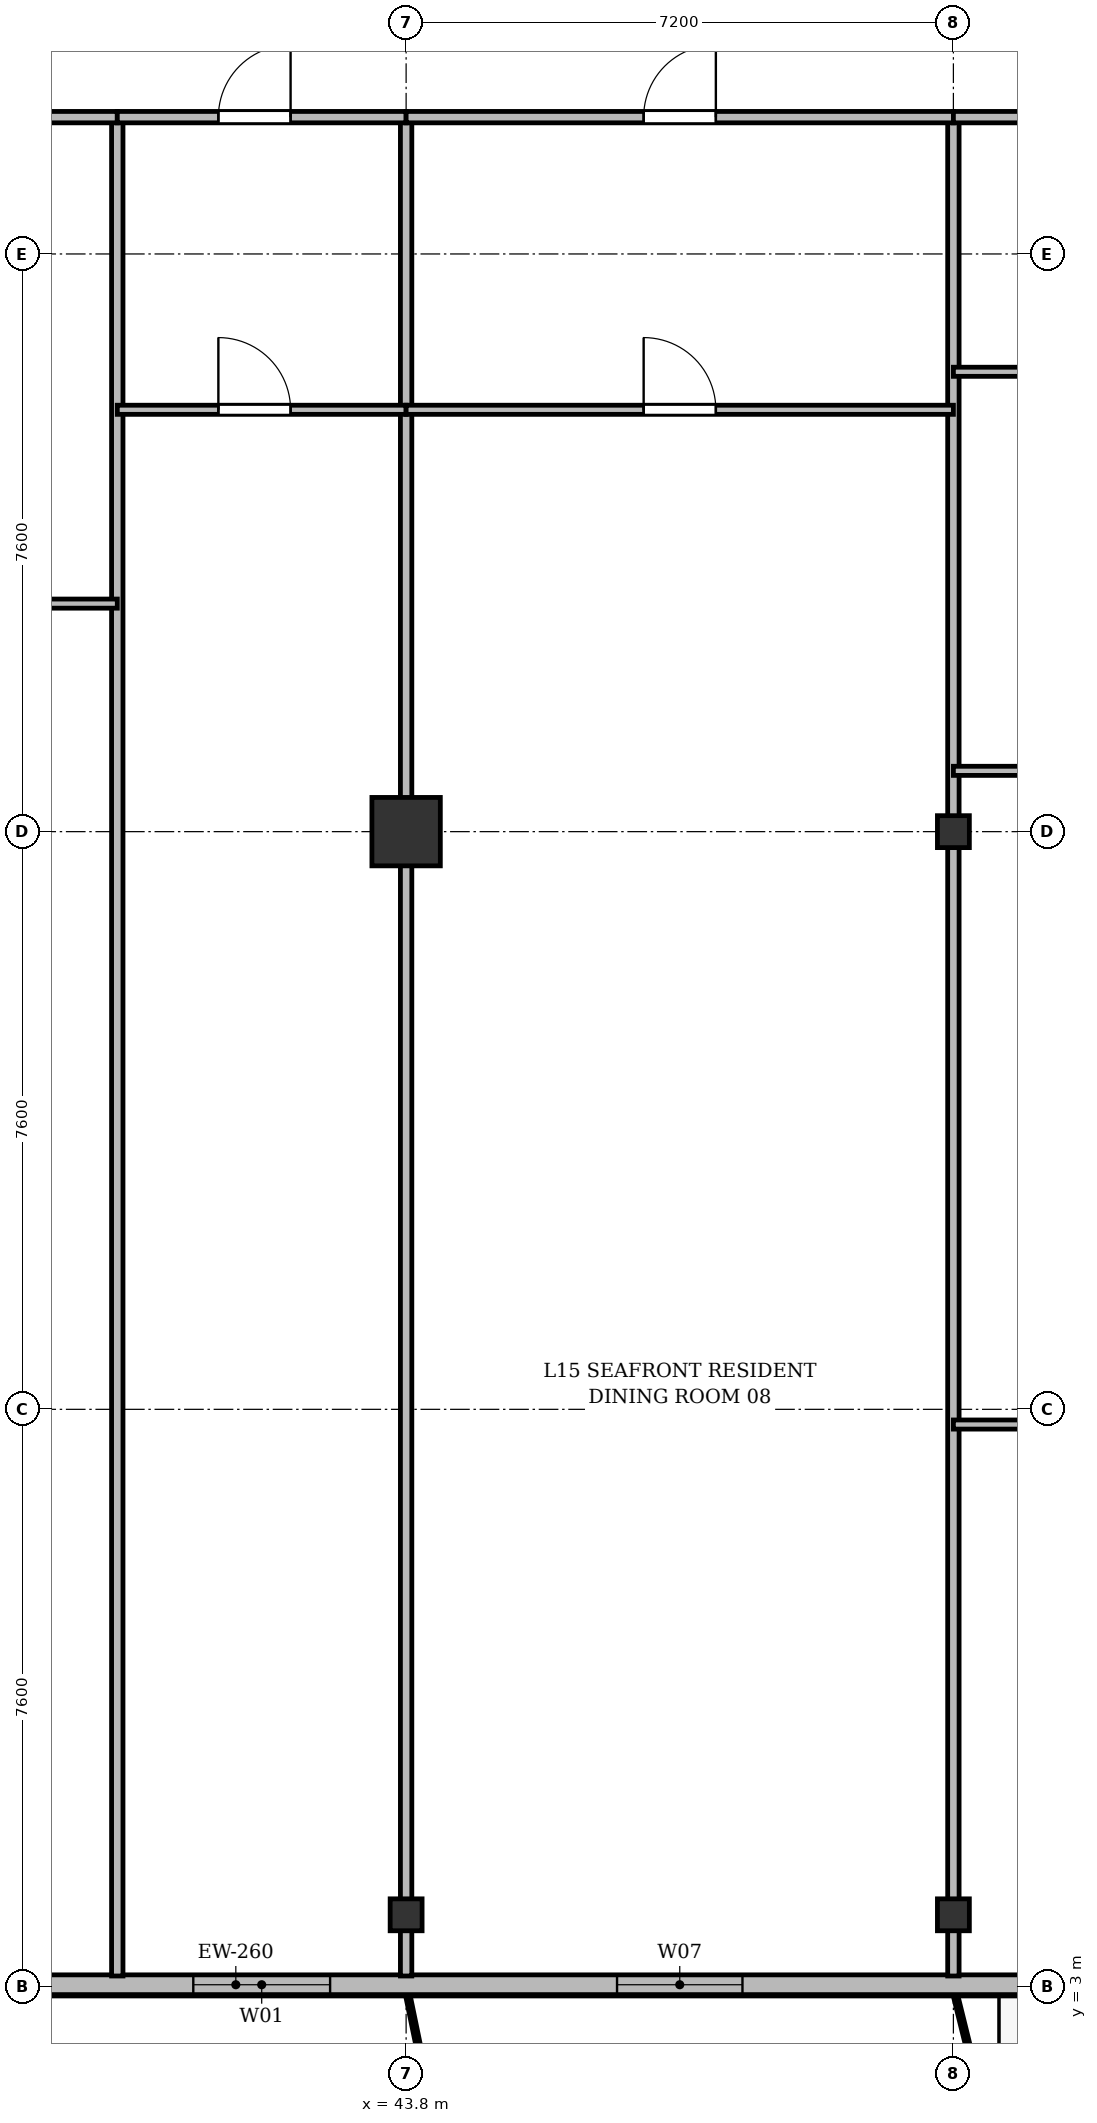
"""IFC4 building model, lengths in metres.
Left out: names, types, materials, properties, quantities, classifications, styles, units other than length and angle.
Written with IfcOpenShell. Run it as: python <this file> out.ifc"""

import sys

from ifc_helpers import new_model, si_unit, direction, frame, frame_2d, origin, origin_2d, place, context, subcontext, project, spatial, rectangle, i_section, extrude, source, transform, mapped, element, fill, save


model = new_model("IFC4")
c1 = context("Model", 3, precision=1e-05, world=origin(), true_north=direction((0.0, 1.0)))
c2 = subcontext(c1, "Body", "Model", "MODEL_VIEW")
j1 = project(units=[si_unit("LENGTHUNIT", "METRE"), si_unit("PLANEANGLEUNIT", "RADIAN")], contexts=[c1])
p1 = place(None, origin())
s1 = spatial("IfcSite", under=j1, at=p1, CompositionType="ELEMENT")
p2 = place(p1, origin())
s2 = spatial("IfcBuilding", under=s1, at=p2, CompositionType="ELEMENT")
p3 = place(p2, frame((0.0, 0.0, 59.5)))
s3 = spatial("IfcBuildingStorey", under=s2, at=p3, CompositionType="ELEMENT", Elevation=59.5)
m1 = source(origin(), c2, "Body", "SweptSolid", [
    extrude(i_section(OverallWidth=0.42, OverallDepth=0.42, WebThickness=0.026, FlangeThickness=0.04, at=origin_2d()), origin(), (0.0, 0.0, 1.0), 3.6),
])
p4 = place(p3, frame((43.8, 3.95, 0.0), z_axis=(0.0, 0.0, 1.0), x_axis=(1.0, 0.0, 0.0)))
e1 = element("IfcColumn", 1, at=p4, inside=s3, PredefinedType="COLUMN", context=c2, shape_type="MappedRepresentation", body=[
    mapped(m1, transform((0.0, 0.0, 0.0), x_axis=(1.0, 0.0, 0.0), y_axis=(0.0, 1.0, 0.0), z_axis=(0.0, 0.0, 1.0), scale=1.0)),
])
m2 = source(origin(), c2, "Body", "SweptSolid", [
    extrude(rectangle(XDim=0.9, YDim=0.9, at=origin_2d()), origin(), (0.0, 0.0, 1.0), 3.6),
])
p5 = place(p3, frame((43.8, 18.2, 0.0), z_axis=(0.0, 0.0, 1.0), x_axis=(1.0, 0.0, 0.0)))
e2 = element("IfcColumn", 2, at=p5, inside=s3, PredefinedType="COLUMN", context=c2, shape_type="MappedRepresentation", body=[
    mapped(m2, transform((0.0, 0.0, 0.0), x_axis=(1.0, 0.0, 0.0), y_axis=(0.0, 1.0, 0.0), z_axis=(0.0, 0.0, 1.0), scale=1.0)),
])
for number, where, z_axis, x_axis in (
    (3, (51.0, 3.95, 0.0), (0.0, 0.0, 1.0), (1.0, 0.0, 0.0)),
    (4, (51.0, 18.2, 0.0), (0.0, 0.0, 1.0), (1.0, 0.0, 0.0)),
):
    element("IfcColumn", number, at=place(p3, frame(where, z_axis=z_axis, x_axis=x_axis)), inside=s3, PredefinedType="COLUMN", context=c2, shape_type="MappedRepresentation", body=[
        mapped(m1, transform((0.0, 0.0, 0.0), x_axis=(1.0, 0.0, 0.0), y_axis=(0.0, 1.0, 0.0), z_axis=(0.0, 0.0, 1.0), scale=1.0)),
    ])
p6 = place(p3, frame((66.9, 3.03, 0.0), z_axis=(0.0, 0.0, 1.0), x_axis=(-1.0, 0.0, 0.0)))
e5 = element("IfcWall", 5, at=p6, inside=s3, PredefinedType="SOLIDWALL", context=c2, shape_type="SweptSolid", body=[
    extrude(rectangle(XDim=59.4, YDim=0.26, at=frame_2d((29.7, 0.0))), origin(), (0.0, 0.0, 1.0), 3.34),
])
p7 = place(p6, frame((3.6, 0.0, 0.9)))
e6 = element("IfcOpeningElement", 6, at=p7, cuts=e5, PredefinedType="OPENING", context=c2, shape_type="SweptSolid", body=[
    extrude(rectangle(XDim=2.2, YDim=1.8, at=frame_2d((1.1, 0.9))), frame((0.0, 0.14, 0.0), z_axis=(0.0, -1.0, 0.0), x_axis=(1.0, 0.0, 0.0)), (0.0, 0.0, 1.0), 0.28),
])
p8 = place(p6, frame((9.18, 0.0, 0.0)))
e7 = element("IfcOpeningElement", 7, at=p8, cuts=e5, PredefinedType="OPENING", context=c2, shape_type="SweptSolid", body=[
    extrude(rectangle(XDim=1.2, YDim=2.2, at=frame_2d((0.6, 1.1))), frame((0.0, 0.14, 0.0), z_axis=(0.0, -1.0, 0.0), x_axis=(1.0, 0.0, 0.0)), (0.0, 0.0, 1.0), 0.28),
])
p9 = place(p6, frame((12.95, 0.0, 0.9)))
e8 = element("IfcOpeningElement", 8, at=p9, cuts=e5, PredefinedType="OPENING", context=c2, shape_type="SweptSolid", body=[
    extrude(rectangle(XDim=2.0, YDim=1.95, at=frame_2d((1.0, 0.975))), frame((0.0, 0.14, 0.0), z_axis=(0.0, -1.0, 0.0), x_axis=(1.0, 0.0, 0.0)), (0.0, 0.0, 1.0), 0.28),
])
p10 = place(p6, frame((18.675, 0.0, 0.9)))
e9 = element("IfcOpeningElement", 9, at=p10, cuts=e5, PredefinedType="OPENING", context=c2, shape_type="SweptSolid", body=[
    extrude(rectangle(XDim=1.65, YDim=1.85, at=frame_2d((0.825, 0.925))), frame((0.0, 0.14, 0.0), z_axis=(0.0, -1.0, 0.0), x_axis=(1.0, 0.0, 0.0)), (0.0, 0.0, 1.0), 0.28),
])
p11 = place(p6, frame((24.1, 0.0, 0.9)))
e10 = element("IfcOpeningElement", 10, at=p11, cuts=e5, PredefinedType="OPENING", context=c2, shape_type="SweptSolid", body=[
    extrude(rectangle(XDim=1.8, YDim=1.8, at=frame_2d((0.9, 0.9))), frame((0.0, 0.14, 0.0), z_axis=(0.0, -1.0, 0.0), x_axis=(1.0, 0.0, 0.0)), (0.0, 0.0, 1.0), 0.28),
])
p12 = place(p6, frame((28.1, 0.0, 0.9)))
e11 = element("IfcOpeningElement", 11, at=p12, cuts=e5, PredefinedType="OPENING", context=c2, shape_type="SweptSolid", body=[
    extrude(rectangle(XDim=2.2, YDim=1.8, at=frame_2d((1.1, 0.9))), frame((0.0, 0.14, 0.0), z_axis=(0.0, -1.0, 0.0), x_axis=(1.0, 0.0, 0.0)), (0.0, 0.0, 1.0), 0.28),
])
p13 = place(p6, frame((33.15, 0.0, 0.9)))
e12 = element("IfcOpeningElement", 12, at=p13, cuts=e5, PredefinedType="OPENING", context=c2, shape_type="SweptSolid", body=[
    extrude(rectangle(XDim=1.5, YDim=1.75, at=frame_2d((0.75, 0.875))), frame((0.0, 0.14, 0.0), z_axis=(0.0, -1.0, 0.0), x_axis=(1.0, 0.0, 0.0)), (0.0, 0.0, 1.0), 0.28),
])
p14 = place(p6, frame((40.301, 0.0, 0.0)))
e13 = element("IfcOpeningElement", 13, at=p14, cuts=e5, PredefinedType="OPENING", context=c2, shape_type="SweptSolid", body=[
    extrude(rectangle(XDim=1.2, YDim=2.2, at=frame_2d((0.6, 1.1))), frame((0.0, 0.14, 0.0), z_axis=(0.0, -1.0, 0.0), x_axis=(1.0, 0.0, 0.0)), (0.0, 0.0, 1.0), 0.28),
])
p15 = place(p6, frame((46.575, 0.0, 0.9)))
e14 = element("IfcOpeningElement", 14, at=p15, cuts=e5, PredefinedType="OPENING", context=c2, shape_type="SweptSolid", body=[
    extrude(rectangle(XDim=1.65, YDim=1.85, at=frame_2d((0.825, 0.925))), frame((0.0, 0.14, 0.0), z_axis=(0.0, -1.0, 0.0), x_axis=(1.0, 0.0, 0.0)), (0.0, 0.0, 1.0), 0.28),
])
p16 = place(p6, frame((53.136, 0.0, 0.0)))
e15 = element("IfcOpeningElement", 15, at=p16, cuts=e5, PredefinedType="OPENING", context=c2, shape_type="SweptSolid", body=[
    extrude(rectangle(XDim=1.2, YDim=2.2, at=frame_2d((0.6, 1.1))), frame((0.0, 0.14, 0.0), z_axis=(0.0, -1.0, 0.0), x_axis=(1.0, 0.0, 0.0)), (0.0, 0.0, 1.0), 0.28),
])
p17 = place(p6, frame((55.3, 0.0, 0.9)))
e16 = element("IfcOpeningElement", 16, at=p17, cuts=e5, PredefinedType="OPENING", context=c2, shape_type="SweptSolid", body=[
    extrude(rectangle(XDim=2.2, YDim=1.8, at=frame_2d((1.1, 0.9))), frame((0.0, 0.14, 0.0), z_axis=(0.0, -1.0, 0.0), x_axis=(1.0, 0.0, 0.0)), (0.0, 0.0, 1.0), 0.28),
])
p18 = place(p3, frame((40.0, 3.145, 0.0), z_axis=(0.0, 0.0, 1.0), x_axis=(0.0, 1.0, 0.0)))
e17 = element("IfcWall", 17, at=p18, inside=s3, PredefinedType="PARTITIONING", context=c2, shape_type="SweptSolid", body=[
    extrude(rectangle(XDim=24.455, YDim=0.15, at=frame_2d((12.228, 0.0))), origin(), (0.0, 0.0, 1.0), 2.69),
])
for number, where, z_axis, x_axis in (
    (18, (43.8, 3.145, 0.0), (0.0, 0.0, 1.0), (0.0, 1.0, 0.0)),
    (19, (51.0, 3.145, 0.0), (0.0, 0.0, 1.0), (0.0, 1.0, 0.0)),
):
    element("IfcWall", number, at=place(p3, frame(where, z_axis=z_axis, x_axis=x_axis)), inside=s3, PredefinedType="PARTITIONING", context=c2, shape_type="SweptSolid", body=[
        extrude(rectangle(XDim=24.455, YDim=0.15, at=frame_2d((12.228, 0.0))), origin(), (0.0, 0.0, 1.0), 2.752),
    ])
p19 = place(p3, frame((35.4, 27.6, 0.0), z_axis=(0.0, 0.0, 1.0), x_axis=(1.0, 0.0, 0.0)))
e20 = element("IfcWall", 20, at=p19, inside=s3, PredefinedType="PARTITIONING", context=c2, shape_type="SweptSolid", body=[
    extrude(rectangle(XDim=4.6, YDim=0.15, at=frame_2d((2.3, 0.0))), origin(), (0.0, 0.0, 1.0), 3.34),
])
p20 = place(p19, frame((1.825, 0.0, 0.0)))
e21 = element("IfcOpeningElement", 21, at=p20, cuts=e20, PredefinedType="OPENING", context=c2, shape_type="SweptSolid", body=[
    extrude(rectangle(XDim=0.95, YDim=2.15, at=frame_2d((0.475, 1.075))), frame((0.0, 0.085, 0.0), z_axis=(0.0, -1.0, 0.0), x_axis=(1.0, 0.0, 0.0)), (0.0, 0.0, 1.0), 0.17),
])
p21 = place(p3, frame((35.4, 21.2, 0.0), z_axis=(0.0, 0.0, 1.0), x_axis=(1.0, 0.0, 0.0)))
e22 = element("IfcWall", 22, at=p21, inside=s3, PredefinedType="PARTITIONING", context=c2, shape_type="SweptSolid", body=[
    extrude(rectangle(XDim=4.6, YDim=0.12, at=frame_2d((2.3, 0.0))), origin(), (0.0, 0.0, 1.0), 3.34),
])
p22 = place(p21, frame((1.825, 0.0, 0.0)))
e23 = element("IfcOpeningElement", 23, at=p22, cuts=e22, PredefinedType="OPENING", context=c2, shape_type="SweptSolid", body=[
    extrude(rectangle(XDim=0.95, YDim=2.15, at=frame_2d((0.475, 1.075))), frame((0.0, 0.07, 0.0), z_axis=(0.0, -1.0, 0.0), x_axis=(1.0, 0.0, 0.0)), (0.0, 0.0, 1.0), 0.14),
])
p23 = place(p3, frame((40.0, 27.6, 0.0), z_axis=(0.0, 0.0, 1.0), x_axis=(1.0, 0.0, 0.0)))
e24 = element("IfcWall", 24, at=p23, inside=s3, PredefinedType="PARTITIONING", context=c2, shape_type="SweptSolid", body=[
    extrude(rectangle(XDim=3.8, YDim=0.15, at=frame_2d((1.9, 0.0))), origin(), (0.0, 0.0, 1.0), 2.752),
])
p24 = place(p23, frame((1.33, 0.0, 0.0)))
e25 = element("IfcOpeningElement", 25, at=p24, cuts=e24, PredefinedType="OPENING", context=c2, shape_type="SweptSolid", body=[
    extrude(rectangle(XDim=0.95, YDim=2.15, at=frame_2d((0.475, 1.075))), frame((0.0, 0.085, 0.0), z_axis=(0.0, -1.0, 0.0), x_axis=(1.0, 0.0, 0.0)), (0.0, 0.0, 1.0), 0.17),
])
p25 = place(p3, frame((40.0, 23.75, 0.0), z_axis=(0.0, 0.0, 1.0), x_axis=(1.0, 0.0, 0.0)))
e26 = element("IfcWall", 26, at=p25, inside=s3, PredefinedType="PARTITIONING", context=c2, shape_type="SweptSolid", body=[
    extrude(rectangle(XDim=3.8, YDim=0.12, at=frame_2d((1.9, 0.0))), origin(), (0.0, 0.0, 1.0), 2.752),
])
p26 = place(p25, frame((1.33, 0.0, 0.0)))
e27 = element("IfcOpeningElement", 27, at=p26, cuts=e26, PredefinedType="OPENING", context=c2, shape_type="SweptSolid", body=[
    extrude(rectangle(XDim=0.95, YDim=2.15, at=frame_2d((0.475, 1.075))), frame((0.0, 0.07, 0.0), z_axis=(0.0, -1.0, 0.0), x_axis=(1.0, 0.0, 0.0)), (0.0, 0.0, 1.0), 0.14),
])
p27 = place(p3, frame((43.8, 27.6, 0.0), z_axis=(0.0, 0.0, 1.0), x_axis=(1.0, 0.0, 0.0)))
e28 = element("IfcWall", 28, at=p27, inside=s3, PredefinedType="PARTITIONING", context=c2, shape_type="SweptSolid", body=[
    extrude(rectangle(XDim=7.2, YDim=0.15, at=frame_2d((3.6, 0.0))), origin(), (0.0, 0.0, 1.0), 2.752),
])
p28 = place(p27, frame((3.125, 0.0, 0.0)))
e29 = element("IfcOpeningElement", 29, at=p28, cuts=e28, PredefinedType="OPENING", context=c2, shape_type="SweptSolid", body=[
    extrude(rectangle(XDim=0.95, YDim=2.15, at=frame_2d((0.475, 1.075))), frame((0.0, 0.085, 0.0), z_axis=(0.0, -1.0, 0.0), x_axis=(1.0, 0.0, 0.0)), (0.0, 0.0, 1.0), 0.17),
])
p29 = place(p3, frame((43.8, 23.75, 0.0), z_axis=(0.0, 0.0, 1.0), x_axis=(1.0, 0.0, 0.0)))
e30 = element("IfcWall", 30, at=p29, inside=s3, PredefinedType="PARTITIONING", context=c2, shape_type="SweptSolid", body=[
    extrude(rectangle(XDim=7.2, YDim=0.12, at=frame_2d((3.6, 0.0))), origin(), (0.0, 0.0, 1.0), 2.752),
])
p30 = place(p29, frame((3.125, 0.0, 0.0)))
e31 = element("IfcOpeningElement", 31, at=p30, cuts=e30, PredefinedType="OPENING", context=c2, shape_type="SweptSolid", body=[
    extrude(rectangle(XDim=0.95, YDim=2.15, at=frame_2d((0.475, 1.075))), frame((0.0, 0.07, 0.0), z_axis=(0.0, -1.0, 0.0), x_axis=(1.0, 0.0, 0.0)), (0.0, 0.0, 1.0), 0.14),
])
p31 = place(p3, frame((51.0, 19.0, 0.0), z_axis=(0.0, 0.0, 1.0), x_axis=(1.0, 0.0, 0.0)))
e32 = element("IfcWall", 32, at=p31, inside=s3, PredefinedType="PARTITIONING", context=c2, shape_type="SweptSolid", body=[
    extrude(rectangle(XDim=7.8, YDim=0.12, at=frame_2d((3.9, 0.0))), origin(), (0.0, 0.0, 1.0), 2.752),
])
p32 = place(p31, frame((3.333, 0.0, 0.0)))
e33 = element("IfcOpeningElement", 33, at=p32, cuts=e32, PredefinedType="OPENING", context=c2, shape_type="SweptSolid", body=[
    extrude(rectangle(XDim=0.95, YDim=2.15, at=frame_2d((0.475, 1.075))), frame((0.0, 0.07, 0.0), z_axis=(0.0, -1.0, 0.0), x_axis=(1.0, 0.0, 0.0)), (0.0, 0.0, 1.0), 0.14),
])
p33 = place(p3, frame((51.0, 24.25, 0.0), z_axis=(0.0, 0.0, 1.0), x_axis=(1.0, 0.0, 0.0)))
e34 = element("IfcWall", 34, at=p33, inside=s3, PredefinedType="PARTITIONING", context=c2, shape_type="SweptSolid", body=[
    extrude(rectangle(XDim=2.4, YDim=0.12, at=frame_2d((1.2, 0.0))), origin(), (0.0, 0.0, 1.0), 2.752),
])
p34 = place(p3, frame((51.0, 27.6, 0.0), z_axis=(0.0, 0.0, 1.0), x_axis=(1.0, 0.0, 0.0)))
e35 = element("IfcWall", 35, at=p34, inside=s3, PredefinedType="PARTITIONING", context=c2, shape_type="SweptSolid", body=[
    extrude(rectangle(XDim=7.8, YDim=0.15, at=frame_2d((3.9, 0.0))), origin(), (0.0, 0.0, 1.0), 2.752),
])
p35 = place(p34, frame((5.172, 0.0, 0.0)))
e36 = element("IfcOpeningElement", 36, at=p35, cuts=e35, PredefinedType="OPENING", context=c2, shape_type="SweptSolid", body=[
    extrude(rectangle(XDim=0.95, YDim=2.15, at=frame_2d((0.475, 1.075))), frame((0.0, 0.085, 0.0), z_axis=(0.0, -1.0, 0.0), x_axis=(1.0, 0.0, 0.0)), (0.0, 0.0, 1.0), 0.17),
])
p36 = place(p3, frame((51.0, 10.4, 0.0), z_axis=(0.0, 0.0, 1.0), x_axis=(1.0, 0.0, 0.0)))
e37 = element("IfcWall", 37, at=p36, inside=s3, PredefinedType="PARTITIONING", context=c2, shape_type="SweptSolid", body=[
    extrude(rectangle(XDim=3.9, YDim=0.12, at=frame_2d((1.95, 0.0))), origin(), (0.0, 0.0, 1.0), 2.752),
])
p37 = place(p36, frame((1.475, 0.0, 0.0)))
e38 = element("IfcOpeningElement", 38, at=p37, cuts=e37, PredefinedType="OPENING", context=c2, shape_type="SweptSolid", body=[
    extrude(rectangle(XDim=0.95, YDim=2.15, at=frame_2d((0.475, 1.075))), frame((0.0, 0.07, 0.0), z_axis=(0.0, -1.0, 0.0), x_axis=(1.0, 0.0, 0.0)), (0.0, 0.0, 1.0), 0.14),
])
m3 = source(origin(), c2, "Body", "SweptSolid", [
    extrude(rectangle(XDim=1.65, YDim=1.85, at=frame_2d((0.825, 0.925))), frame((0.0, 0.03, 0.0), z_axis=(0.0, -1.0, 0.0), x_axis=(1.0, 0.0, 0.0)), (0.0, 0.0, 1.0), 0.06),
])
p38 = place(p10, origin())
e39 = element("IfcWindow", 39, at=p38, inside=s3, PartitioningType="SINGLE_PANEL", PredefinedType="WINDOW", context=c2, shape_type="MappedRepresentation", body=[
    mapped(m3, transform((0.0, 0.0, 0.0), x_axis=(1.0, 0.0, 0.0), y_axis=(0.0, 1.0, 0.0), z_axis=(0.0, 0.0, 1.0), scale=1.0)),
])
fill(e9, e39)
m4 = source(origin(), c2, "Body", "SweptSolid", [
    extrude(rectangle(XDim=1.8, YDim=1.8, at=frame_2d((0.9, 0.9))), frame((0.0, 0.03, 0.0), z_axis=(0.0, -1.0, 0.0), x_axis=(1.0, 0.0, 0.0)), (0.0, 0.0, 1.0), 0.06),
])
p39 = place(p11, origin())
e40 = element("IfcWindow", 40, at=p39, inside=s3, PartitioningType="SINGLE_PANEL", PredefinedType="WINDOW", context=c2, shape_type="MappedRepresentation", body=[
    mapped(m4, transform((0.0, 0.0, 0.0), x_axis=(1.0, 0.0, 0.0), y_axis=(0.0, 1.0, 0.0), z_axis=(0.0, 0.0, 1.0), scale=1.0)),
])
fill(e10, e40)
m5 = source(origin(), c2, "Body", "SweptSolid", [
    extrude(rectangle(XDim=0.95, YDim=2.15, at=frame_2d((0.475, 1.075))), frame((0.0, 0.025, 0.0), z_axis=(0.0, -1.0, 0.0), x_axis=(1.0, 0.0, 0.0)), (0.0, 0.0, 1.0), 0.05),
])
p40 = place(p24, origin())
e41 = element("IfcDoor", 41, at=p40, inside=s3, OperationType="SINGLE_SWING_RIGHT", PredefinedType="DOOR", context=c2, shape_type="MappedRepresentation", body=[
    mapped(m5, transform((0.0, 0.0, 0.0), x_axis=(1.0, 0.0, 0.0), y_axis=(0.0, 1.0, 0.0), z_axis=(0.0, 0.0, 1.0), scale=1.0)),
])
fill(e25, e41)
p41 = place(p26, origin())
e42 = element("IfcDoor", 42, at=p41, inside=s3, OperationType="SINGLE_SWING_LEFT", PredefinedType="DOOR", context=c2, shape_type="MappedRepresentation", body=[
    mapped(m5, transform((0.0, 0.0, 0.0), x_axis=(1.0, 0.0, 0.0), y_axis=(0.0, 1.0, 0.0), z_axis=(0.0, 0.0, 1.0), scale=1.0)),
])
fill(e27, e42)
p42 = place(p28, origin())
e43 = element("IfcDoor", 43, at=p42, inside=s3, OperationType="SINGLE_SWING_RIGHT", PredefinedType="DOOR", context=c2, shape_type="MappedRepresentation", body=[
    mapped(m5, transform((0.0, 0.0, 0.0), x_axis=(1.0, 0.0, 0.0), y_axis=(0.0, 1.0, 0.0), z_axis=(0.0, 0.0, 1.0), scale=1.0)),
])
fill(e29, e43)
p43 = place(p30, origin())
e44 = element("IfcDoor", 44, at=p43, inside=s3, OperationType="SINGLE_SWING_LEFT", PredefinedType="DOOR", context=c2, shape_type="MappedRepresentation", body=[
    mapped(m5, transform((0.0, 0.0, 0.0), x_axis=(1.0, 0.0, 0.0), y_axis=(0.0, 1.0, 0.0), z_axis=(0.0, 0.0, 1.0), scale=1.0)),
])
fill(e31, e44)
save(model, sys.argv[1])
